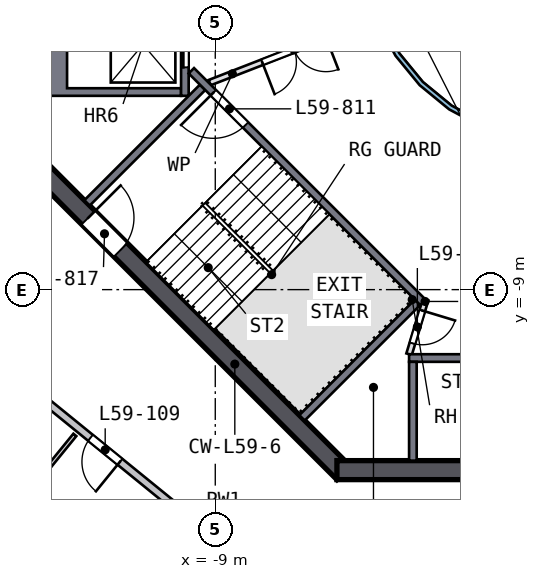
"""IFC4 building model, lengths in metres.
Left out: names, types, materials, properties, quantities, classifications, styles, units other than length and angle.
Written with IfcOpenShell. Run it as: python <this file> out.ifc"""

import sys

from ifc_helpers import new_model, si_unit, direction, frame, frame_2d, origin, place, context, subcontext, project, spatial, polyline, rectangle, outline, extrude, element, fill, save


model = new_model("IFC4")
c1 = context("Model", 3, precision=1e-05, world=origin(), true_north=direction((0.0, 1.0)))
c2 = subcontext(c1, "Body", "Model", "MODEL_VIEW")
j1 = project(units=[si_unit("LENGTHUNIT", "METRE"), si_unit("PLANEANGLEUNIT", "RADIAN")], contexts=[c1])
p1 = place(None, origin())
s1 = spatial("IfcSite", under=j1, at=p1, CompositionType="ELEMENT")
p2 = place(p1, origin())
s2 = spatial("IfcBuilding", under=s1, at=p2, CompositionType="ELEMENT")
p3 = place(p2, frame((0.0, 0.0, 241.0)))
s3 = spatial("IfcBuildingStorey", under=s2, at=p3, CompositionType="ELEMENT", Elevation=241.0)
p4 = place(p3, frame((-13.823, -5.622, 0.0), z_axis=(0.0, 0.0, 1.0), x_axis=(0.707106781, -0.707106781, 0.0)))
e1 = element("IfcWall", 1, at=p4, inside=s3, PredefinedType="SHEAR", context=c2, shape_type="SweptSolid", body=[
    extrude(rectangle(XDim=11.598, YDim=0.5, at=frame_2d((5.799, 0.0))), origin(), (0.0, 0.0, 1.0), 3.5),
])
p5 = place(p4, frame((2.099, 0.0, 0.0)))
e2 = element("IfcOpeningElement", 2, at=p5, cuts=e1, PredefinedType="OPENING", context=c2, shape_type="SweptSolid", body=[
    extrude(rectangle(XDim=1.2, YDim=2.1, at=frame_2d((0.6, 1.05))), frame((0.0, 0.26, 0.0), z_axis=(0.0, -1.0, 0.0), x_axis=(1.0, 0.0, 0.0)), (0.0, 0.0, 1.0), 0.52),
])
p6 = place(p3, frame((-5.799, -13.75, 0.0), z_axis=(0.0, 0.0, 1.0), x_axis=(1.0, 0.0, 0.0)))
e3 = element("IfcWall", 3, at=p6, inside=s3, PredefinedType="SHEAR", context=c2, shape_type="SweptSolid", body=[
    extrude(rectangle(XDim=11.598, YDim=0.5, at=frame_2d((5.799, 0.0))), origin(), (0.0, 0.0, 1.0), 3.5),
])
p7 = place(p3, origin())
e4 = element("IfcWall", 4, at=p7, inside=s3, PredefinedType="SOLIDWALL", context=c2, shape_type="SweptSolid", body=[
    extrude(outline(polyline([(-13.5, -3.9), (-13.5, -1.2), (-9.9, -1.2), (-9.9, -1.4), (-12.9, -1.4), (-12.9, -3.7), (-9.9, -3.7), (-9.9, -3.9), (-13.5, -3.9)])), origin(), (0.0, 0.0, 1.0), 3.19),
])
p8 = place(p3, frame((-9.8, -1.2, 0.0), z_axis=(0.0, 0.0, 1.0), x_axis=(0.0, -1.0, 0.0)))
e5 = element("IfcWall", 5, at=p8, inside=s3, PredefinedType="SOLIDWALL", context=c2, shape_type="SweptSolid", body=[
    extrude(rectangle(XDim=2.7, YDim=0.2, at=frame_2d((1.35, 0.0))), origin(), (0.0, 0.0, 1.0), 3.19),
])
p9 = place(p8, frame((0.75, 0.0, 0.0)))
e6 = element("IfcOpeningElement", 6, at=p9, cuts=e5, PredefinedType="OPENING", context=c2, shape_type="SweptSolid", body=[
    extrude(rectangle(XDim=1.2, YDim=2.1, at=frame_2d((0.6, 1.05))), frame((0.0, 0.11, 0.0), z_axis=(0.0, -1.0, 0.0), x_axis=(1.0, 0.0, 0.0)), (0.0, 0.0, 1.0), 0.22),
])
p10 = place(p3, frame((-3.9, -10.8, 0.0), z_axis=(0.0, 0.0, 1.0), x_axis=(1.0, 0.0, 0.0)))
e7 = element("IfcWall", 7, at=p10, inside=s3, PredefinedType="SOLIDWALL", context=c2, shape_type="SweptSolid", body=[
    extrude(rectangle(XDim=7.8, YDim=0.2, at=frame_2d((3.9, 0.0))), origin(), (0.0, 0.0, 1.0), 3.19),
])
p11 = place(p10, frame((3.45, 0.0, 0.0)))
e8 = element("IfcOpeningElement", 8, at=p11, cuts=e7, PredefinedType="OPENING", context=c2, shape_type="SweptSolid", body=[
    extrude(rectangle(XDim=0.9, YDim=2.1, at=frame_2d((0.45, 1.05))), frame((0.0, 0.11, 0.0), z_axis=(0.0, -1.0, 0.0), x_axis=(1.0, 0.0, 0.0)), (0.0, 0.0, 1.0), 0.22),
])
p12 = place(p3, frame((-3.8, -10.9, 0.0), z_axis=(0.0, 0.0, 1.0), x_axis=(0.0, -1.0, 0.0)))
e9 = element("IfcWall", 9, at=p12, inside=s3, PredefinedType="SOLIDWALL", context=c2, shape_type="SweptSolid", body=[
    extrude(rectangle(XDim=2.6, YDim=0.2, at=frame_2d((1.3, 0.0))), origin(), (0.0, 0.0, 1.0), 3.19),
])
p13 = place(p3, frame((-3.535, -9.334, 0.0), z_axis=(0.0, 0.0, 1.0), x_axis=(-0.707120946, 0.707092617, 0.0)))
e10 = element("IfcWall", 10, at=p13, inside=s3, PredefinedType="SOLIDWALL", context=c2, shape_type="SweptSolid", body=[
    extrude(rectangle(XDim=8.618, YDim=0.2, at=frame_2d((4.309, 0.0))), origin(), (0.0, 0.0, 1.0), 3.19),
])
p14 = place(p13, frame((6.6, 0.0, 0.0)))
e11 = element("IfcOpeningElement", 11, at=p14, cuts=e10, PredefinedType="OPENING", context=c2, shape_type="SweptSolid", body=[
    extrude(rectangle(XDim=1.2, YDim=2.1, at=frame_2d((0.6, 1.05))), frame((0.0, 0.11, 0.0), z_axis=(0.0, -1.0, 0.0), x_axis=(1.0, 0.0, 0.0)), (0.0, 0.0, 1.0), 0.22),
])
for number, where, z_axis, x_axis in (
    (12, (-9.334, -3.677, 0.0), (0.0, 0.0, 1.0), (-0.707, -0.707, 0.0)),
    (13, (-3.677, -9.334, 0.0), (0.0, 0.0, 1.0), (-0.707, -0.707, 0.0)),
):
    element("IfcWall", number, at=place(p3, frame(where, z_axis=z_axis, x_axis=x_axis)), inside=s3, PredefinedType="SOLIDWALL", context=c2, shape_type="SweptSolid", body=[
        extrude(rectangle(XDim=4.3, YDim=0.2, at=frame_2d((2.15, 0.0))), origin(), (0.0, 0.0, 1.0), 3.19),
    ])
p15 = place(p3, frame((-3.465, -9.263, 0.0), z_axis=(0.0, 0.0, 1.0), x_axis=(-0.289808785, -0.957084567, 0.0)))
e14 = element("IfcWall", 14, at=p15, inside=s3, PredefinedType="PARTITIONING", context=c2, shape_type="SweptSolid", body=[
    extrude(rectangle(XDim=1.501, YDim=0.15, at=frame_2d((0.75, 0.0))), origin(), (0.0, 0.0, 1.0), 3.19),
])
p16 = place(p15, frame((0.301, 0.0, 0.0)))
e15 = element("IfcOpeningElement", 15, at=p16, cuts=e14, PredefinedType="OPENING", context=c2, shape_type="SweptSolid", body=[
    extrude(rectangle(XDim=0.9, YDim=2.1, at=frame_2d((0.45, 1.05))), frame((0.0, 0.085, 0.0), z_axis=(0.0, -1.0, 0.0), x_axis=(1.0, 0.0, 0.0)), (0.0, 0.0, 1.0), 0.17),
])
p17 = place(p3, frame((-4.782, -1.857, 0.0), z_axis=(0.0, 0.0, 1.0), x_axis=(-0.932155279, -0.362058746, 0.0)))
e16 = element("IfcWall", 16, at=p17, inside=s3, PredefinedType="PARTITIONING", context=c2, shape_type="SweptSolid", body=[
    extrude(rectangle(XDim=4.682, YDim=0.15, at=frame_2d((2.341, 0.0))), origin(), (0.0, 0.0, 1.0), 3.19),
])
p18 = place(p17, frame((1.4, 0.0, 0.0)))
e17 = element("IfcOpeningElement", 17, at=p18, cuts=e16, PredefinedType="OPENING", context=c2, shape_type="SweptSolid", body=[
    extrude(rectangle(XDim=1.8, YDim=2.1, at=frame_2d((0.9, 1.05))), frame((0.0, 0.085, 0.0), z_axis=(0.0, -1.0, 0.0), x_axis=(1.0, 0.0, 0.0)), (0.0, 0.0, 1.0), 0.17),
])
p19 = place(p3, origin())
e18 = element("IfcWall", 18, at=p19, inside=s3, PredefinedType="SOLIDWALL", context=c2, shape_type="SweptSolid", body=[
    extrude(outline(polyline([(5.021, -0.999), (4.73, -1.959), (4.257, -2.844), (3.62, -3.62), (2.844, -4.257), (1.959, -4.73), (0.999, -5.021), (0.0, -5.12), (-0.999, -5.021), (-1.959, -4.73), (-2.844, -4.257), (-3.62, -3.62), (-4.257, -2.844), (-4.73, -1.959), (-5.021, -0.999), (-5.12, 0.0), (-5.021, 0.999), (-4.73, 1.959), (-4.257, 2.844), (-3.62, 3.62), (-2.844, 4.257), (-1.959, 4.73), (-0.999, 5.021), (0.0, 5.12), (0.999, 5.021), (1.959, 4.73), (2.844, 4.257), (3.62, 3.62), (4.257, 2.844), (4.73, 1.959), (5.021, 0.999), (5.12, 0.0), (5.021, -0.999)]), holes=[polyline([(4.904, 0.976), (4.619, 1.913), (4.157, 2.778), (3.535, 3.535), (2.778, 4.157), (1.913, 4.619), (0.976, 4.904), (0.0, 5.0), (-0.976, 4.904), (-1.913, 4.619), (-2.778, 4.157), (-3.535, 3.535), (-4.157, 2.778), (-4.619, 1.913), (-4.904, 0.976), (-5.0, 0.0), (-4.904, -0.976), (-4.619, -1.913), (-4.157, -2.778), (-3.535, -3.535), (-2.778, -4.157), (-1.913, -4.619), (-0.976, -4.904), (0.0, -5.0), (0.976, -4.904), (1.913, -4.619), (2.778, -4.157), (3.535, -3.535), (4.157, -2.778), (4.619, -1.913), (4.904, -0.976), (5.0, 0.0), (4.904, 0.976)])]), origin(), (0.0, 0.0, 1.0), 3.19),
])
p20 = place(p3, frame((-7.513, -16.78, 0.0), z_axis=(0.0, 0.0, 1.0), x_axis=(-0.775832995, 0.63093832, 0.0)))
e19 = element("IfcWall", 19, at=p20, inside=s3, PredefinedType="SOLIDWALL", context=c2, shape_type="SweptSolid", body=[
    extrude(rectangle(XDim=9.517, YDim=0.2, at=frame_2d((4.758, 0.0))), origin(), (0.0, 0.0, 1.0), 3.19),
])
p21 = place(p20, frame((5.15, 0.0, 0.0)))
e20 = element("IfcOpeningElement", 20, at=p21, cuts=e19, PredefinedType="OPENING", context=c2, shape_type="SweptSolid", body=[
    extrude(rectangle(XDim=1.0, YDim=2.1, at=frame_2d((0.5, 1.05))), frame((0.0, 0.11, 0.0), z_axis=(0.0, -1.0, 0.0), x_axis=(1.0, 0.0, 0.0)), (0.0, 0.0, 1.0), 0.22),
])
p22 = place(p3, frame((-14.651, -15.228, 0.0), z_axis=(0.0, 0.0, 1.0), x_axis=(0.630936464, 0.775834504, 0.0)))
e21 = element("IfcWall", 21, at=p22, inside=s3, PredefinedType="PARTITIONING", context=c2, shape_type="SweptSolid", body=[
    extrude(rectangle(XDim=3.1, YDim=0.1, at=frame_2d((1.55, 0.0))), origin(), (0.0, 0.0, 1.0), 3.19),
])
p23 = place(p22, frame((1.15, 0.0, 0.0)))
e22 = element("IfcOpeningElement", 22, at=p23, cuts=e21, PredefinedType="OPENING", context=c2, shape_type="SweptSolid", body=[
    extrude(rectangle(XDim=0.9, YDim=2.1, at=frame_2d((0.45, 1.05))), frame((0.0, 0.06, 0.0), z_axis=(0.0, -1.0, 0.0), x_axis=(1.0, 0.0, 0.0)), (0.0, 0.0, 1.0), 0.12),
])
p24 = place(p9, origin())
e23 = element("IfcDoor", 23, at=p24, inside=s3, OperationType="DOUBLE_DOOR_SLIDING", PredefinedType="DOOR", context=c2, shape_type="SweptSolid", body=[
    extrude(rectangle(XDim=1.2, YDim=2.1, at=frame_2d((0.6, 1.05))), frame((0.0, 0.025, 0.0), z_axis=(0.0, -1.0, 0.0), x_axis=(1.0, 0.0, 0.0)), (0.0, 0.0, 1.0), 0.05),
])
fill(e6, e23)
p25 = place(p14, origin())
e24 = element("IfcDoor", 24, at=p25, inside=s3, OperationType="SINGLE_SWING_RIGHT", PredefinedType="DOOR", context=c2, shape_type="SweptSolid", body=[
    extrude(rectangle(XDim=1.2, YDim=2.1, at=frame_2d((0.6, 1.05))), frame((0.0, 0.025, 0.0), z_axis=(0.0, -1.0, 0.0), x_axis=(1.0, 0.0, 0.0)), (0.0, 0.0, 1.0), 0.05),
])
fill(e11, e24)
p26 = place(p5, origin())
e25 = element("IfcDoor", 25, at=p26, inside=s3, OperationType="SINGLE_SWING_LEFT", PredefinedType="DOOR", context=c2, shape_type="SweptSolid", body=[
    extrude(rectangle(XDim=1.2, YDim=2.1, at=frame_2d((0.6, 1.05))), frame((0.0, 0.025, 0.0), z_axis=(0.0, -1.0, 0.0), x_axis=(1.0, 0.0, 0.0)), (0.0, 0.0, 1.0), 0.05),
])
fill(e2, e25)
p27 = place(p16, origin())
e26 = element("IfcDoor", 26, at=p27, inside=s3, OperationType="SINGLE_SWING_LEFT", PredefinedType="DOOR", context=c2, shape_type="SweptSolid", body=[
    extrude(rectangle(XDim=0.9, YDim=2.1, at=frame_2d((0.45, 1.05))), frame((0.0, 0.025, 0.0), z_axis=(0.0, -1.0, 0.0), x_axis=(1.0, 0.0, 0.0)), (0.0, 0.0, 1.0), 0.05),
])
fill(e15, e26)
p28 = place(p18, origin())
e27 = element("IfcDoor", 27, at=p28, inside=s3, OperationType="DOUBLE_DOOR_SINGLE_SWING", PredefinedType="DOOR", context=c2, shape_type="SweptSolid", body=[
    extrude(rectangle(XDim=1.8, YDim=2.1, at=frame_2d((0.9, 1.05))), frame((0.0, 0.025, 0.0), z_axis=(0.0, -1.0, 0.0), x_axis=(1.0, 0.0, 0.0)), (0.0, 0.0, 1.0), 0.05),
])
fill(e17, e27)
p29 = place(p21, origin())
e28 = element("IfcDoor", 28, at=p29, inside=s3, OperationType="SINGLE_SWING_LEFT", PredefinedType="DOOR", context=c2, shape_type="SweptSolid", body=[
    extrude(rectangle(XDim=1.0, YDim=2.1, at=frame_2d((0.5, 1.05))), frame((0.0, 0.025, 0.0), z_axis=(0.0, -1.0, 0.0), x_axis=(1.0, 0.0, 0.0)), (0.0, 0.0, 1.0), 0.05),
])
fill(e20, e28)
save(model, sys.argv[1])
